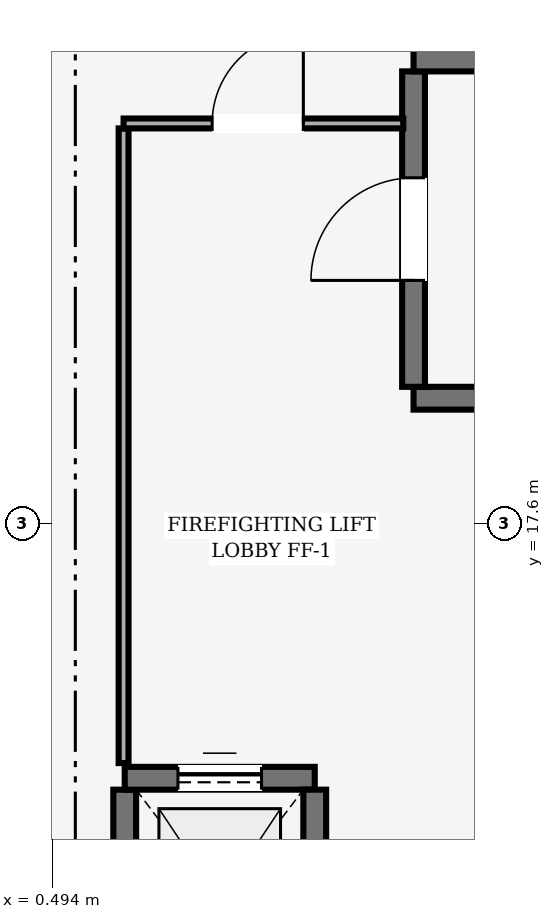
"""IFC4 building model, lengths in metres.
Left out: names, types, materials, properties, quantities, classifications, styles, units other than length and angle.
Written with IfcOpenShell. Run it as: python <this file> out.ifc"""

import sys

from ifc_helpers import new_model, si_unit, direction, frame, frame_2d, origin, place, context, subcontext, project, spatial, rectangle, extrude, element, fill, save


model = new_model("IFC4")
c1 = context("Model", 3, precision=1e-05, world=origin(), true_north=direction((0.0, 1.0)))
c2 = subcontext(c1, "Body", "Model", "MODEL_VIEW")
j1 = project(units=[si_unit("LENGTHUNIT", "METRE"), si_unit("PLANEANGLEUNIT", "RADIAN")], contexts=[c1])
p1 = place(None, origin())
s1 = spatial("IfcSite", under=j1, at=p1, CompositionType="ELEMENT")
p2 = place(p1, origin())
s2 = spatial("IfcBuilding", under=s1, at=p2, CompositionType="ELEMENT")
p3 = place(p2, frame((0.0, 0.0, 15.6)))
s3 = spatial("IfcBuildingStorey", under=s2, at=p3, CompositionType="ELEMENT", Elevation=15.6)
p4 = place(p3, frame((15.43, 19.25, 0.0), z_axis=(0.0, 0.0, 1.0), x_axis=(-1.0, 0.0, 0.0)))
e1 = element("IfcWall", 1, at=p4, inside=s3, PredefinedType="SHEAR", context=c2, shape_type="SweptSolid", body=[
    extrude(rectangle(XDim=10.18, YDim=0.3, at=frame_2d((5.09, 0.0))), origin(), (0.0, 0.0, 1.0), 3.2),
])
p5 = place(p3, frame((5.25, 19.4, 0.0), z_axis=(0.0, 0.0, 1.0), x_axis=(0.0, 1.0, 0.0)))
e2 = element("IfcWall", 2, at=p5, inside=s3, PredefinedType="SHEAR", context=c2, shape_type="SweptSolid", body=[
    extrude(rectangle(XDim=4.15, YDim=0.3, at=frame_2d((2.075, 0.0))), origin(), (0.0, 0.0, 1.0), 3.2),
])
p6 = place(p5, frame((1.4, 0.0, 0.0)))
e3 = element("IfcOpeningElement", 3, at=p6, cuts=e2, PredefinedType="OPENING", context=c2, shape_type="SweptSolid", body=[
    extrude(rectangle(XDim=1.35, YDim=2.2, at=frame_2d((0.675, 1.1))), frame((0.0, 0.15, 0.0), z_axis=(0.0, -1.0, 0.0), x_axis=(1.0, 0.0, 0.0)), (0.0, 0.0, 1.0), 0.3),
])
p7 = place(p3, frame((5.25, 23.7, 0.0), z_axis=(0.0, 0.0, 1.0), x_axis=(1.0, 0.0, 0.0)))
e4 = element("IfcWall", 4, at=p7, inside=s3, PredefinedType="SHEAR", context=c2, shape_type="SweptSolid", body=[
    extrude(rectangle(XDim=10.18, YDim=0.3, at=frame_2d((5.09, 0.0))), origin(), (0.0, 0.0, 1.0), 3.2),
])
p8 = place(p3, frame((1.45, 11.2, 0.0), z_axis=(0.0, 0.0, 1.0), x_axis=(0.0, 1.0, 0.0)))
e5 = element("IfcWall", 5, at=p8, inside=s3, PredefinedType="SHEAR", context=c2, shape_type="SweptSolid", body=[
    extrude(rectangle(XDim=2.9, YDim=0.3, at=frame_2d((1.45, 0.0))), origin(), (0.0, 0.0, 1.0), 3.2),
])
p9 = place(p3, frame((1.45, 14.25, 0.0), z_axis=(0.0, 0.0, 1.0), x_axis=(1.0, 0.0, 0.0)))
e6 = element("IfcWall", 6, at=p9, inside=s3, PredefinedType="SHEAR", context=c2, shape_type="SweptSolid", body=[
    extrude(rectangle(XDim=2.5, YDim=0.3, at=frame_2d((1.25, 0.0))), origin(), (0.0, 0.0, 1.0), 3.2),
])
p10 = place(p9, frame((0.7, 0.0, 0.0)))
e7 = element("IfcOpeningElement", 7, at=p10, cuts=e6, PredefinedType="OPENING", context=c2, shape_type="SweptSolid", body=[
    extrude(rectangle(XDim=1.1, YDim=2.1, at=frame_2d((0.55, 1.05))), frame((0.0, 0.15, 0.0), z_axis=(0.0, -1.0, 0.0), x_axis=(1.0, 0.0, 0.0)), (0.0, 0.0, 1.0), 0.3),
])
p11 = place(p3, frame((3.95, 14.1, 0.0), z_axis=(0.0, 0.0, 1.0), x_axis=(0.0, -1.0, 0.0)))
e8 = element("IfcWall", 8, at=p11, inside=s3, PredefinedType="SHEAR", context=c2, shape_type="SweptSolid", body=[
    extrude(rectangle(XDim=2.9, YDim=0.3, at=frame_2d((1.45, 0.0))), origin(), (0.0, 0.0, 1.0), 3.2),
])
p12 = place(p3, frame((1.435, 14.45, 0.0), z_axis=(0.0, 0.0, 1.0), x_axis=(0.0, 1.0, 0.0)))
e9 = element("IfcWall", 9, at=p12, inside=s3, PredefinedType="PARTITIONING", context=c2, shape_type="SweptSolid", body=[
    extrude(rectangle(XDim=8.35, YDim=0.13, at=frame_2d((4.175, 0.0))), origin(), (0.0, 0.0, 1.0), 3.18),
])
p13 = place(p3, frame((1.435, 22.865, 0.0), z_axis=(0.0, 0.0, 1.0), x_axis=(1.0, 0.0, 0.0)))
e10 = element("IfcWall", 10, at=p13, inside=s3, PredefinedType="PARTITIONING", context=c2, shape_type="SweptSolid", body=[
    extrude(rectangle(XDim=3.68, YDim=0.13, at=frame_2d((1.84, 0.0))), origin(), (0.0, 0.0, 1.0), 3.18),
])
p14 = place(p13, frame((1.165, 0.0, 0.0)))
e11 = element("IfcOpeningElement", 11, at=p14, cuts=e10, PredefinedType="OPENING", context=c2, shape_type="SweptSolid", body=[
    extrude(rectangle(XDim=1.2, YDim=2.15, at=frame_2d((0.6, 1.075))), frame((0.0, 0.065, 0.0), z_axis=(0.0, -1.0, 0.0), x_axis=(1.0, 0.0, 0.0)), (0.0, 0.0, 1.0), 0.13),
])
p15 = place(p6, origin())
e12 = element("IfcDoor", 12, at=p15, inside=s3, OperationType="SINGLE_SWING_LEFT", PredefinedType="DOOR", context=c2, shape_type="SweptSolid", body=[
    extrude(rectangle(XDim=1.35, YDim=2.2, at=frame_2d((0.675, 1.1))), frame((0.0, 0.025, 0.0), z_axis=(0.0, -1.0, 0.0), x_axis=(1.0, 0.0, 0.0)), (0.0, 0.0, 1.0), 0.05),
])
fill(e3, e12)
p16 = place(p10, origin())
e13 = element("IfcDoor", 13, at=p16, inside=s3, OperationType="SLIDING_TO_LEFT", PredefinedType="DOOR", context=c2, shape_type="SweptSolid", body=[
    extrude(rectangle(XDim=1.1, YDim=2.1, at=frame_2d((0.55, 1.05))), frame((0.0, 0.025, 0.0), z_axis=(0.0, -1.0, 0.0), x_axis=(1.0, 0.0, 0.0)), (0.0, 0.0, 1.0), 0.05),
])
fill(e7, e13)
p17 = place(p14, origin())
e14 = element("IfcDoor", 14, at=p17, inside=s3, OperationType="SINGLE_SWING_RIGHT", PredefinedType="DOOR", context=c2, shape_type="SweptSolid", body=[
    extrude(rectangle(XDim=1.2, YDim=2.15, at=frame_2d((0.6, 1.075))), frame((0.0, 0.025, 0.0), z_axis=(0.0, -1.0, 0.0), x_axis=(1.0, 0.0, 0.0)), (0.0, 0.0, 1.0), 0.05),
])
fill(e11, e14)
save(model, sys.argv[1])
